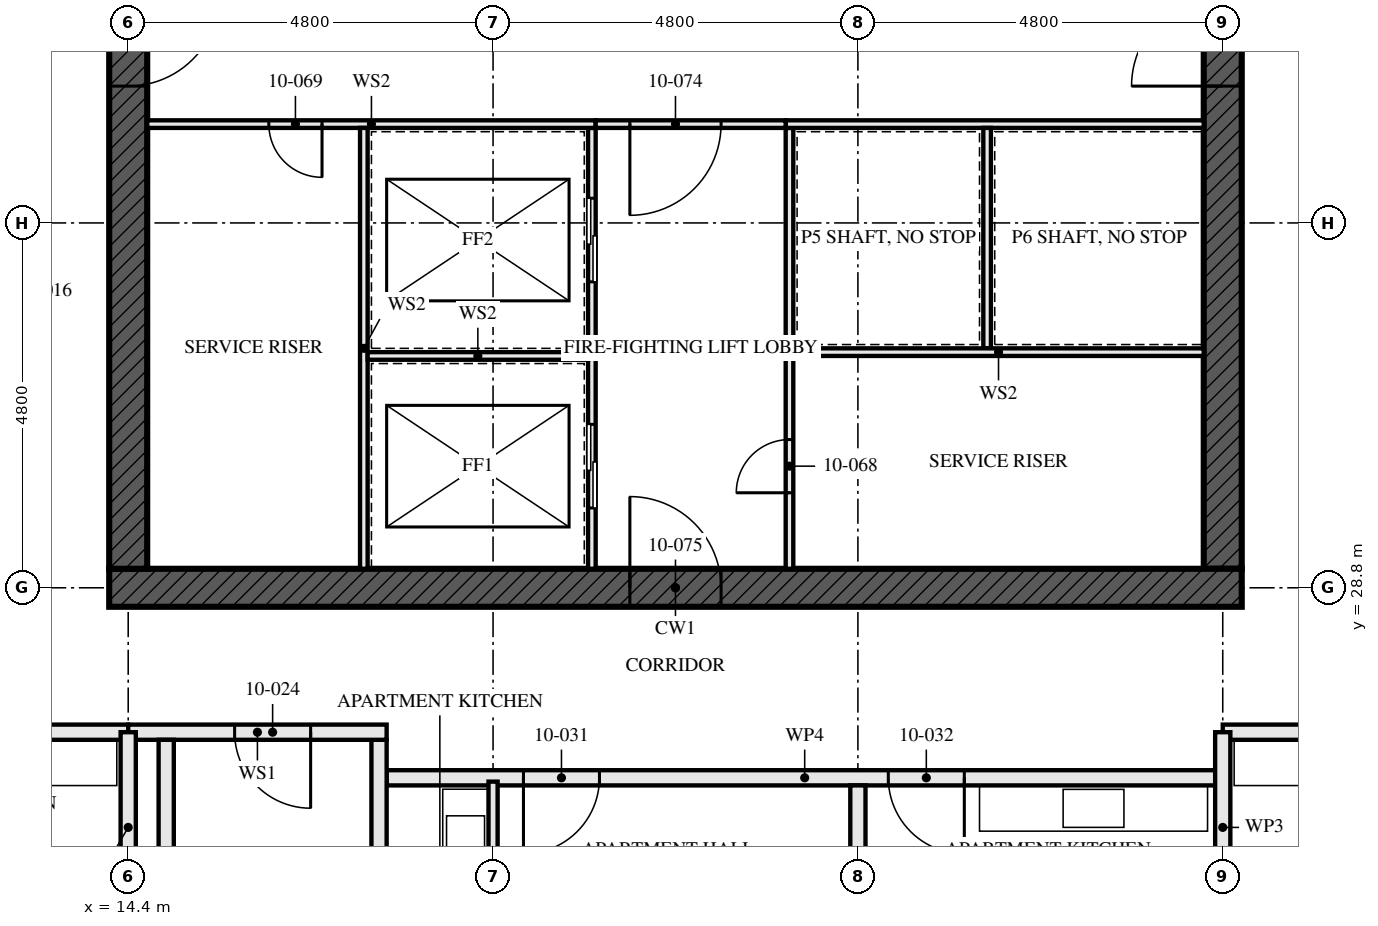
"""IFC4 building model, lengths in metres.
Left out: names, types, materials, properties, quantities, classifications, styles, units other than length and angle.
Written with IfcOpenShell. Run it as: python <this file> out.ifc"""

import sys

from ifc_helpers import new_model, si_unit, direction, frame, frame_2d, origin, place, context, subcontext, project, spatial, rectangle, extrude, element, fill, save


model = new_model("IFC4")
c1 = context("Model", 3, precision=1e-05, world=origin(), true_north=direction((0.0, 1.0)))
c2 = subcontext(c1, "Body", "Model", "MODEL_VIEW")
j1 = project(units=[si_unit("LENGTHUNIT", "METRE"), si_unit("PLANEANGLEUNIT", "RADIAN")], contexts=[c1])
p1 = place(None, origin())
s1 = spatial("IfcSite", under=j1, at=p1, CompositionType="ELEMENT")
p2 = place(p1, origin())
s2 = spatial("IfcBuilding", under=s1, at=p2, CompositionType="ELEMENT")
p3 = place(p2, frame((0.0, 0.0, 41.0)))
s3 = spatial("IfcBuildingStorey", under=s2, at=p3, CompositionType="ELEMENT", Elevation=41.0)
p4 = place(p3, frame((14.15, 28.8, -0.17), z_axis=(0.0, 0.0, 1.0), x_axis=(1.0, 0.0, 0.0)))
e1 = element("IfcWall", 1, at=p4, inside=s3, PredefinedType="SHEAR", context=c2, shape_type="SweptSolid", body=[
    extrude(rectangle(XDim=14.9, YDim=0.5, at=frame_2d((7.45, 0.0))), origin(), (0.0, 0.0, 1.0), 3.5),
])
p5 = place(p4, frame((6.85, 0.0, 0.17)))
e2 = element("IfcOpeningElement", 2, at=p5, cuts=e1, PredefinedType="OPENING", context=c2, shape_type="SweptSolid", body=[
    extrude(rectangle(XDim=1.2, YDim=2.1, at=frame_2d((0.6, 1.05))), frame((0.0, 0.26, 0.0), z_axis=(0.0, -1.0, 0.0), x_axis=(1.0, 0.0, 0.0)), (0.0, 0.0, 1.0), 0.521),
])
p6 = place(p3, frame((14.4, 42.95, -0.17), z_axis=(0.0, 0.0, 1.0), x_axis=(0.0, -1.0, 0.0)))
e3 = element("IfcWall", 3, at=p6, inside=s3, PredefinedType="SHEAR", context=c2, shape_type="SweptSolid", body=[
    extrude(rectangle(XDim=13.9, YDim=0.5, at=frame_2d((6.95, 0.0))), origin(), (0.0, 0.0, 1.0), 3.5),
])
p7 = place(p6, frame((6.35, 0.0, 0.17)))
e4 = element("IfcOpeningElement", 4, at=p7, cuts=e3, PredefinedType="OPENING", context=c2, shape_type="SweptSolid", body=[
    extrude(rectangle(XDim=1.2, YDim=2.1, at=frame_2d((0.6, 1.05))), frame((0.0, 0.26, 0.0), z_axis=(0.0, -1.0, 0.0), x_axis=(1.0, 0.0, 0.0)), (0.0, 0.0, 1.0), 0.521),
])
p8 = place(p3, frame((28.8, 29.05, -0.17), z_axis=(0.0, 0.0, 1.0), x_axis=(0.0, 1.0, 0.0)))
e5 = element("IfcWall", 5, at=p8, inside=s3, PredefinedType="SHEAR", context=c2, shape_type="SweptSolid", body=[
    extrude(rectangle(XDim=13.9, YDim=0.5, at=frame_2d((6.95, 0.0))), origin(), (0.0, 0.0, 1.0), 3.5),
])
p9 = place(p8, frame((6.35, 0.0, 0.17)))
e6 = element("IfcOpeningElement", 6, at=p9, cuts=e5, PredefinedType="OPENING", context=c2, shape_type="SweptSolid", body=[
    extrude(rectangle(XDim=1.2, YDim=2.1, at=frame_2d((0.6, 1.05))), frame((0.0, 0.26, 0.0), z_axis=(0.0, -1.0, 0.0), x_axis=(1.0, 0.0, 0.0)), (0.0, 0.0, 1.0), 0.521),
])
p10 = place(p3, frame((4.8, 26.9, 0.0), z_axis=(0.0, 0.0, 1.0), x_axis=(1.0, 0.0, 0.0)))
e7 = element("IfcWall", 7, at=p10, inside=s3, PredefinedType="PARTITIONING", context=c2, shape_type="SweptSolid", body=[
    extrude(rectangle(XDim=9.6, YDim=0.2, at=frame_2d((4.8, 0.0))), origin(), (0.0, 0.0, 1.0), 3.33),
])
p11 = place(p10, frame((0.4, 0.0, 0.0)))
e8 = element("IfcOpeningElement", 8, at=p11, cuts=e7, PredefinedType="OPENING", context=c2, shape_type="SweptSolid", body=[
    extrude(rectangle(XDim=1.0, YDim=2.1, at=frame_2d((0.5, 1.05))), frame((0.0, 0.111, 0.0), z_axis=(0.0, -1.0, 0.0), x_axis=(1.0, 0.0, 0.0)), (0.0, 0.0, 1.0), 0.221),
])
p12 = place(p10, frame((5.2, 0.0, 0.0)))
e9 = element("IfcOpeningElement", 9, at=p12, cuts=e7, PredefinedType="OPENING", context=c2, shape_type="SweptSolid", body=[
    extrude(rectangle(XDim=1.0, YDim=2.1, at=frame_2d((0.5, 1.05))), frame((0.0, 0.111, 0.0), z_axis=(0.0, -1.0, 0.0), x_axis=(1.0, 0.0, 0.0)), (0.0, 0.0, 1.0), 0.221),
])
for number, where, z_axis, x_axis in (
    (10, (14.9, 22.1, 0.0), (0.0, 0.0, 1.0), (0.0, 1.0, 0.0)),
    (11, (17.7, 22.1, 0.0), (0.0, 0.0, 1.0), (0.0, 1.0, 0.0)),
):
    element("IfcWall", number, at=place(p3, frame(where, z_axis=z_axis, x_axis=x_axis)), inside=s3, PredefinedType="SOLIDWALL", context=c2, shape_type="SweptSolid", body=[
        extrude(rectangle(XDim=4.7, YDim=0.2, at=frame_2d((2.35, 0.0))), origin(), (0.0, 0.0, 1.0), 2.99),
    ])
p13 = place(p3, frame((14.4, 26.9, 0.0), z_axis=(0.0, 0.0, 1.0), x_axis=(1.0, 0.0, 0.0)))
e12 = element("IfcWall", 12, at=p13, inside=s3, PredefinedType="SOLIDWALL", context=c2, shape_type="SweptSolid", body=[
    extrude(rectangle(XDim=3.4, YDim=0.2, at=frame_2d((1.7, 0.0))), origin(), (0.0, 0.0, 1.0), 3.33),
])
p14 = place(p13, frame((1.4, 0.0, 0.0)))
e13 = element("IfcOpeningElement", 13, at=p14, cuts=e12, PredefinedType="OPENING", context=c2, shape_type="SweptSolid", body=[
    extrude(rectangle(XDim=1.0, YDim=2.1, at=frame_2d((0.5, 1.05))), frame((0.0, 0.111, 0.0), z_axis=(0.0, -1.0, 0.0), x_axis=(1.0, 0.0, 0.0)), (0.0, 0.0, 1.0), 0.221),
])
p15 = place(p3, frame((19.2, 21.6, 0.0), z_axis=(0.0, 0.0, 1.0), x_axis=(0.0, 1.0, 0.0)))
e14 = element("IfcWall", 14, at=p15, inside=s3, PredefinedType="PARTITIONING", context=c2, shape_type="SweptSolid", body=[
    extrude(rectangle(XDim=4.65, YDim=0.12, at=frame_2d((2.325, 0.0))), origin(), (0.0, 0.0, 1.0), 2.55),
])
p16 = place(p15, frame((1.875, 0.0, 0.0)))
e15 = element("IfcOpeningElement", 15, at=p16, cuts=e14, PredefinedType="OPENING", context=c2, shape_type="SweptSolid", body=[
    extrude(rectangle(XDim=0.9, YDim=2.1, at=frame_2d((0.45, 1.05))), frame((0.0, 0.071, 0.0), z_axis=(0.0, -1.0, 0.0), x_axis=(1.0, 0.0, 0.0)), (0.0, 0.0, 1.0), 0.141),
])
p17 = place(p3, frame((24.0, 14.795, 0.0), z_axis=(0.0, 0.0, 1.0), x_axis=(0.0, 1.0, 0.0)))
e16 = element("IfcWall", 16, at=p17, inside=s3, PredefinedType="PARTITIONING", context=c2, shape_type="SweptSolid", body=[
    extrude(rectangle(XDim=11.405, YDim=0.2, at=frame_2d((5.703, 0.0))), origin(), (0.0, 0.0, 1.0), 2.55),
])
p18 = place(p3, frame((17.8, 26.3, 0.0), z_axis=(0.0, 0.0, 1.0), x_axis=(1.0, 0.0, 0.0)))
e17 = element("IfcWall", 17, at=p18, inside=s3, PredefinedType="PARTITIONING", context=c2, shape_type="SweptSolid", body=[
    extrude(rectangle(XDim=11.0, YDim=0.2, at=frame_2d((5.5, 0.0))), origin(), (0.0, 0.0, 1.0), 2.55),
])
p19 = place(p18, frame((1.8, 0.0, 0.0)))
e18 = element("IfcOpeningElement", 18, at=p19, cuts=e17, PredefinedType="OPENING", context=c2, shape_type="SweptSolid", body=[
    extrude(rectangle(XDim=1.0, YDim=2.1, at=frame_2d((0.5, 1.05))), frame((0.0, 0.111, 0.0), z_axis=(0.0, -1.0, 0.0), x_axis=(1.0, 0.0, 0.0)), (0.0, 0.0, 1.0), 0.221),
])
p20 = place(p18, frame((6.6, 0.0, 0.0)))
e19 = element("IfcOpeningElement", 19, at=p20, cuts=e17, PredefinedType="OPENING", context=c2, shape_type="SweptSolid", body=[
    extrude(rectangle(XDim=1.0, YDim=2.1, at=frame_2d((0.5, 1.05))), frame((0.0, 0.111, 0.0), z_axis=(0.0, -1.0, 0.0), x_axis=(1.0, 0.0, 0.0)), (0.0, 0.0, 1.0), 0.221),
])
p21 = place(p3, frame((28.8, 26.9, 0.0), z_axis=(0.0, 0.0, 1.0), x_axis=(1.0, 0.0, 0.0)))
e20 = element("IfcWall", 20, at=p21, inside=s3, PredefinedType="PARTITIONING", context=c2, shape_type="SweptSolid", body=[
    extrude(rectangle(XDim=9.6, YDim=0.2, at=frame_2d((4.8, 0.0))), origin(), (0.0, 0.0, 1.0), 3.33),
])
p22 = place(p21, frame((5.2, 0.0, 0.0)))
e21 = element("IfcOpeningElement", 21, at=p22, cuts=e20, PredefinedType="OPENING", context=c2, shape_type="SweptSolid", body=[
    extrude(rectangle(XDim=1.0, YDim=2.1, at=frame_2d((0.5, 1.05))), frame((0.0, 0.111, 0.0), z_axis=(0.0, -1.0, 0.0), x_axis=(1.0, 0.0, 0.0)), (0.0, 0.0, 1.0), 0.221),
])
p23 = place(p3, frame((20.5, 29.05, 0.0), z_axis=(0.0, 0.0, 1.0), x_axis=(0.0, 1.0, 0.0)))
e22 = element("IfcWall", 22, at=p23, inside=s3, PredefinedType="SOLIDWALL", context=c2, shape_type="SweptSolid", body=[
    extrude(rectangle(XDim=5.8, YDim=0.1, at=frame_2d((2.9, 0.0))), origin(), (0.0, 0.0, 1.0), 3.33),
])
p24 = place(p23, frame((0.8, 0.0, 0.0)))
e23 = element("IfcOpeningElement", 23, at=p24, cuts=e22, PredefinedType="OPENING", context=c2, shape_type="SweptSolid", body=[
    extrude(rectangle(XDim=1.1, YDim=2.3, at=frame_2d((0.55, 1.15))), frame((0.0, 0.061, 0.0), z_axis=(0.0, -1.0, 0.0), x_axis=(1.0, 0.0, 0.0)), (0.0, 0.0, 1.0), 0.121),
])
p25 = place(p23, frame((3.775, 0.0, 0.0)))
e24 = element("IfcOpeningElement", 24, at=p25, cuts=e22, PredefinedType="OPENING", context=c2, shape_type="SweptSolid", body=[
    extrude(rectangle(XDim=1.1, YDim=2.3, at=frame_2d((0.55, 1.15))), frame((0.0, 0.061, 0.0), z_axis=(0.0, -1.0, 0.0), x_axis=(1.0, 0.0, 0.0)), (0.0, 0.0, 1.0), 0.121),
])
p26 = place(p3, frame((23.1, 29.05, 0.0), z_axis=(0.0, 0.0, 1.0), x_axis=(0.0, 1.0, 0.0)))
e25 = element("IfcWall", 25, at=p26, inside=s3, PredefinedType="SOLIDWALL", context=c2, shape_type="SweptSolid", body=[
    extrude(rectangle(XDim=5.8, YDim=0.1, at=frame_2d((2.9, 0.0))), origin(), (0.0, 0.0, 1.0), 3.33),
])
p27 = place(p26, frame((1.0, 0.0, 0.0)))
e26 = element("IfcOpeningElement", 26, at=p27, cuts=e25, PredefinedType="OPENING", context=c2, shape_type="SweptSolid", body=[
    extrude(rectangle(XDim=0.7, YDim=2.1, at=frame_2d((0.35, 1.05))), frame((0.0, 0.061, 0.0), z_axis=(0.0, -1.0, 0.0), x_axis=(1.0, 0.0, 0.0)), (0.0, 0.0, 1.0), 0.121),
])
p28 = place(p3, frame((14.65, 34.9, 0.0), z_axis=(0.0, 0.0, 1.0), x_axis=(1.0, 0.0, 0.0)))
e27 = element("IfcWall", 27, at=p28, inside=s3, PredefinedType="SOLIDWALL", context=c2, shape_type="SweptSolid", body=[
    extrude(rectangle(XDim=5.9, YDim=0.1, at=frame_2d((2.95, 0.0))), origin(), (0.0, 0.0, 1.0), 3.33),
])
p29 = place(p28, frame((1.6, 0.0, 0.0)))
e28 = element("IfcOpeningElement", 28, at=p29, cuts=e27, PredefinedType="OPENING", context=c2, shape_type="SweptSolid", body=[
    extrude(rectangle(XDim=0.7, YDim=2.1, at=frame_2d((0.35, 1.05))), frame((0.0, 0.061, 0.0), z_axis=(0.0, -1.0, 0.0), x_axis=(1.0, 0.0, 0.0)), (0.0, 0.0, 1.0), 0.121),
])
p30 = place(p3, frame((23.05, 34.9, 0.0), z_axis=(0.0, 0.0, 1.0), x_axis=(1.0, 0.0, 0.0)))
e29 = element("IfcWall", 29, at=p30, inside=s3, PredefinedType="SOLIDWALL", context=c2, shape_type="SweptSolid", body=[
    extrude(rectangle(XDim=5.5, YDim=0.1, at=frame_2d((2.75, 0.0))), origin(), (0.0, 0.0, 1.0), 3.33),
])
p31 = place(p3, frame((20.55, 34.9, 0.0), z_axis=(0.0, 0.0, 1.0), x_axis=(1.0, 0.0, 0.0)))
e30 = element("IfcWall", 30, at=p31, inside=s3, PredefinedType="SOLIDWALL", context=c2, shape_type="SweptSolid", body=[
    extrude(rectangle(XDim=2.5, YDim=0.1, at=frame_2d((1.25, 0.0))), origin(), (0.0, 0.0, 1.0), 3.33),
])
p32 = place(p31, frame((0.45, 0.0, 0.0)))
e31 = element("IfcOpeningElement", 31, at=p32, cuts=e30, PredefinedType="OPENING", context=c2, shape_type="SweptSolid", body=[
    extrude(rectangle(XDim=1.2, YDim=2.1, at=frame_2d((0.6, 1.05))), frame((0.0, 0.061, 0.0), z_axis=(0.0, -1.0, 0.0), x_axis=(1.0, 0.0, 0.0)), (0.0, 0.0, 1.0), 0.121),
])
p33 = place(p3, frame((17.5, 29.05, 0.0), z_axis=(0.0, 0.0, 1.0), x_axis=(0.0, 1.0, 0.0)))
e32 = element("IfcWall", 32, at=p33, inside=s3, PredefinedType="SOLIDWALL", context=c2, shape_type="SweptSolid", body=[
    extrude(rectangle(XDim=5.8, YDim=0.1, at=frame_2d((2.9, 0.0))), origin(), (0.0, 0.0, 1.0), 3.33),
])
p34 = place(p3, frame((17.55, 31.85, 0.0), z_axis=(0.0, 0.0, 1.0), x_axis=(1.0, 0.0, 0.0)))
e33 = element("IfcWall", 33, at=p34, inside=s3, PredefinedType="SOLIDWALL", context=c2, shape_type="SweptSolid", body=[
    extrude(rectangle(XDim=2.9, YDim=0.1, at=frame_2d((1.45, 0.0))), origin(), (0.0, 0.0, 1.0), 3.33),
])
p35 = place(p3, frame((25.7, 31.95, 0.0), z_axis=(0.0, 0.0, 1.0), x_axis=(0.0, 1.0, 0.0)))
e34 = element("IfcWall", 34, at=p35, inside=s3, PredefinedType="SOLIDWALL", context=c2, shape_type="SweptSolid", body=[
    extrude(rectangle(XDim=2.9, YDim=0.1, at=frame_2d((1.45, 0.0))), origin(), (0.0, 0.0, 1.0), 3.33),
])
p36 = place(p3, frame((23.15, 31.9, 0.0), z_axis=(0.0, 0.0, 1.0), x_axis=(1.0, 0.0, 0.0)))
e35 = element("IfcWall", 35, at=p36, inside=s3, PredefinedType="SOLIDWALL", context=c2, shape_type="SweptSolid", body=[
    extrude(rectangle(XDim=5.4, YDim=0.1, at=frame_2d((2.7, 0.0))), origin(), (0.0, 0.0, 1.0), 3.33),
])
for number, where, z_axis, x_axis in (
    (36, (14.4, 24.395, 0.0), (0.0, 0.0, 1.0), (0.0, 1.0, 0.0)),
    (37, (28.8, 24.395, 0.0), (0.0, 0.0, 1.0), (0.0, 1.0, 0.0)),
):
    element("IfcWall", number, at=place(p3, frame(where, z_axis=z_axis, x_axis=x_axis)), inside=s3, PredefinedType="PARTITIONING", context=c2, shape_type="SweptSolid", body=[
        extrude(rectangle(XDim=2.505, YDim=0.2, at=frame_2d((1.252, 0.0))), origin(), (0.0, 0.0, 1.0), 2.32),
    ])
p37 = place(p14, frame((1.0, 0.0, 0.0), z_axis=(0.0, 0.0, 1.0), x_axis=(-1.0, 0.0, 0.0)))
e38 = element("IfcDoor", 38, at=p37, inside=s3, OperationType="SINGLE_SWING_RIGHT", PredefinedType="DOOR", context=c2, shape_type="SweptSolid", body=[
    extrude(rectangle(XDim=1.0, YDim=2.1, at=frame_2d((0.5, 1.05))), frame((0.0, 0.032, 0.0), z_axis=(0.0, -1.0, 0.0), x_axis=(1.0, 0.0, 0.0)), (0.0, 0.0, 1.0), 0.064),
])
fill(e13, e38)
p38 = place(p19, frame((1.0, 0.0, 0.0), z_axis=(0.0, 0.0, 1.0), x_axis=(-1.0, 0.0, 0.0)))
e39 = element("IfcDoor", 39, at=p38, inside=s3, OperationType="SINGLE_SWING_LEFT", PredefinedType="DOOR", context=c2, shape_type="SweptSolid", body=[
    extrude(rectangle(XDim=1.0, YDim=2.1, at=frame_2d((0.5, 1.05))), frame((0.0, 0.027, 0.0), z_axis=(0.0, -1.0, 0.0), x_axis=(1.0, 0.0, 0.0)), (0.0, 0.0, 1.0), 0.054),
])
fill(e18, e39)
p39 = place(p20, frame((1.0, 0.0, 0.0), z_axis=(0.0, 0.0, 1.0), x_axis=(-1.0, 0.0, 0.0)))
e40 = element("IfcDoor", 40, at=p39, inside=s3, OperationType="SINGLE_SWING_RIGHT", PredefinedType="DOOR", context=c2, shape_type="SweptSolid", body=[
    extrude(rectangle(XDim=1.0, YDim=2.1, at=frame_2d((0.5, 1.05))), frame((0.0, 0.027, 0.0), z_axis=(0.0, -1.0, 0.0), x_axis=(1.0, 0.0, 0.0)), (0.0, 0.0, 1.0), 0.054),
])
fill(e19, e40)
p40 = place(p24, origin())
e41 = element("IfcDoor", 41, at=p40, inside=s3, OperationType="SLIDING_TO_LEFT", PredefinedType="DOOR", context=c2, shape_type="SweptSolid", body=[
    extrude(rectangle(XDim=1.1, YDim=2.3, at=frame_2d((0.55, 1.15))), frame((0.0, 0.05, 0.0), z_axis=(0.0, -1.0, 0.0), x_axis=(1.0, 0.0, 0.0)), (0.0, 0.0, 1.0), 0.1),
])
fill(e23, e41)
p41 = place(p25, origin())
e42 = element("IfcDoor", 42, at=p41, inside=s3, OperationType="SLIDING_TO_LEFT", PredefinedType="DOOR", context=c2, shape_type="SweptSolid", body=[
    extrude(rectangle(XDim=1.1, YDim=2.3, at=frame_2d((0.55, 1.15))), frame((0.0, 0.05, 0.0), z_axis=(0.0, -1.0, 0.0), x_axis=(1.0, 0.0, 0.0)), (0.0, 0.0, 1.0), 0.1),
])
fill(e24, e42)
p42 = place(p27, origin())
e43 = element("IfcDoor", 43, at=p42, inside=s3, OperationType="SINGLE_SWING_RIGHT", PredefinedType="DOOR", context=c2, shape_type="SweptSolid", body=[
    extrude(rectangle(XDim=0.7, YDim=2.1, at=frame_2d((0.35, 1.05))), frame((0.0, 0.027, 0.0), z_axis=(0.0, -1.0, 0.0), x_axis=(1.0, 0.0, 0.0)), (0.0, 0.0, 1.0), 0.054),
])
fill(e26, e43)
p43 = place(p29, frame((0.7, 0.0, 0.0), z_axis=(0.0, 0.0, 1.0), x_axis=(-1.0, 0.0, 0.0)))
e44 = element("IfcDoor", 44, at=p43, inside=s3, OperationType="SINGLE_SWING_RIGHT", PredefinedType="DOOR", context=c2, shape_type="SweptSolid", body=[
    extrude(rectangle(XDim=0.7, YDim=2.1, at=frame_2d((0.35, 1.05))), frame((0.0, 0.027, 0.0), z_axis=(0.0, -1.0, 0.0), x_axis=(1.0, 0.0, 0.0)), (0.0, 0.0, 1.0), 0.054),
])
fill(e28, e44)
p44 = place(p32, frame((1.2, 0.0, 0.0), z_axis=(0.0, 0.0, 1.0), x_axis=(-1.0, 0.0, 0.0)))
e45 = element("IfcDoor", 45, at=p44, inside=s3, OperationType="SINGLE_SWING_LEFT", PredefinedType="DOOR", context=c2, shape_type="SweptSolid", body=[
    extrude(rectangle(XDim=1.2, YDim=2.1, at=frame_2d((0.6, 1.05))), frame((0.0, 0.027, 0.0), z_axis=(0.0, -1.0, 0.0), x_axis=(1.0, 0.0, 0.0)), (0.0, 0.0, 1.0), 0.054),
])
fill(e31, e45)
p45 = place(p5, origin())
e46 = element("IfcDoor", 46, at=p45, inside=s3, OperationType="SINGLE_SWING_LEFT", PredefinedType="DOOR", context=c2, shape_type="SweptSolid", body=[
    extrude(rectangle(XDim=1.2, YDim=2.1, at=frame_2d((0.6, 1.05))), frame((0.0, 0.027, 0.0), z_axis=(0.0, -1.0, 0.0), x_axis=(1.0, 0.0, 0.0)), (0.0, 0.0, 1.0), 0.054),
])
fill(e2, e46)
p46 = place(p7, origin())
e47 = element("IfcDoor", 47, at=p46, inside=s3, OperationType="SINGLE_SWING_LEFT", PredefinedType="DOOR", context=c2, shape_type="SweptSolid", body=[
    extrude(rectangle(XDim=1.2, YDim=2.1, at=frame_2d((0.6, 1.05))), frame((0.0, 0.027, 0.0), z_axis=(0.0, -1.0, 0.0), x_axis=(1.0, 0.0, 0.0)), (0.0, 0.0, 1.0), 0.054),
])
fill(e4, e47)
p47 = place(p9, origin())
e48 = element("IfcDoor", 48, at=p47, inside=s3, OperationType="SINGLE_SWING_LEFT", PredefinedType="DOOR", context=c2, shape_type="SweptSolid", body=[
    extrude(rectangle(XDim=1.2, YDim=2.1, at=frame_2d((0.6, 1.05))), frame((0.0, 0.027, 0.0), z_axis=(0.0, -1.0, 0.0), x_axis=(1.0, 0.0, 0.0)), (0.0, 0.0, 1.0), 0.054),
])
fill(e6, e48)
save(model, sys.argv[1])
